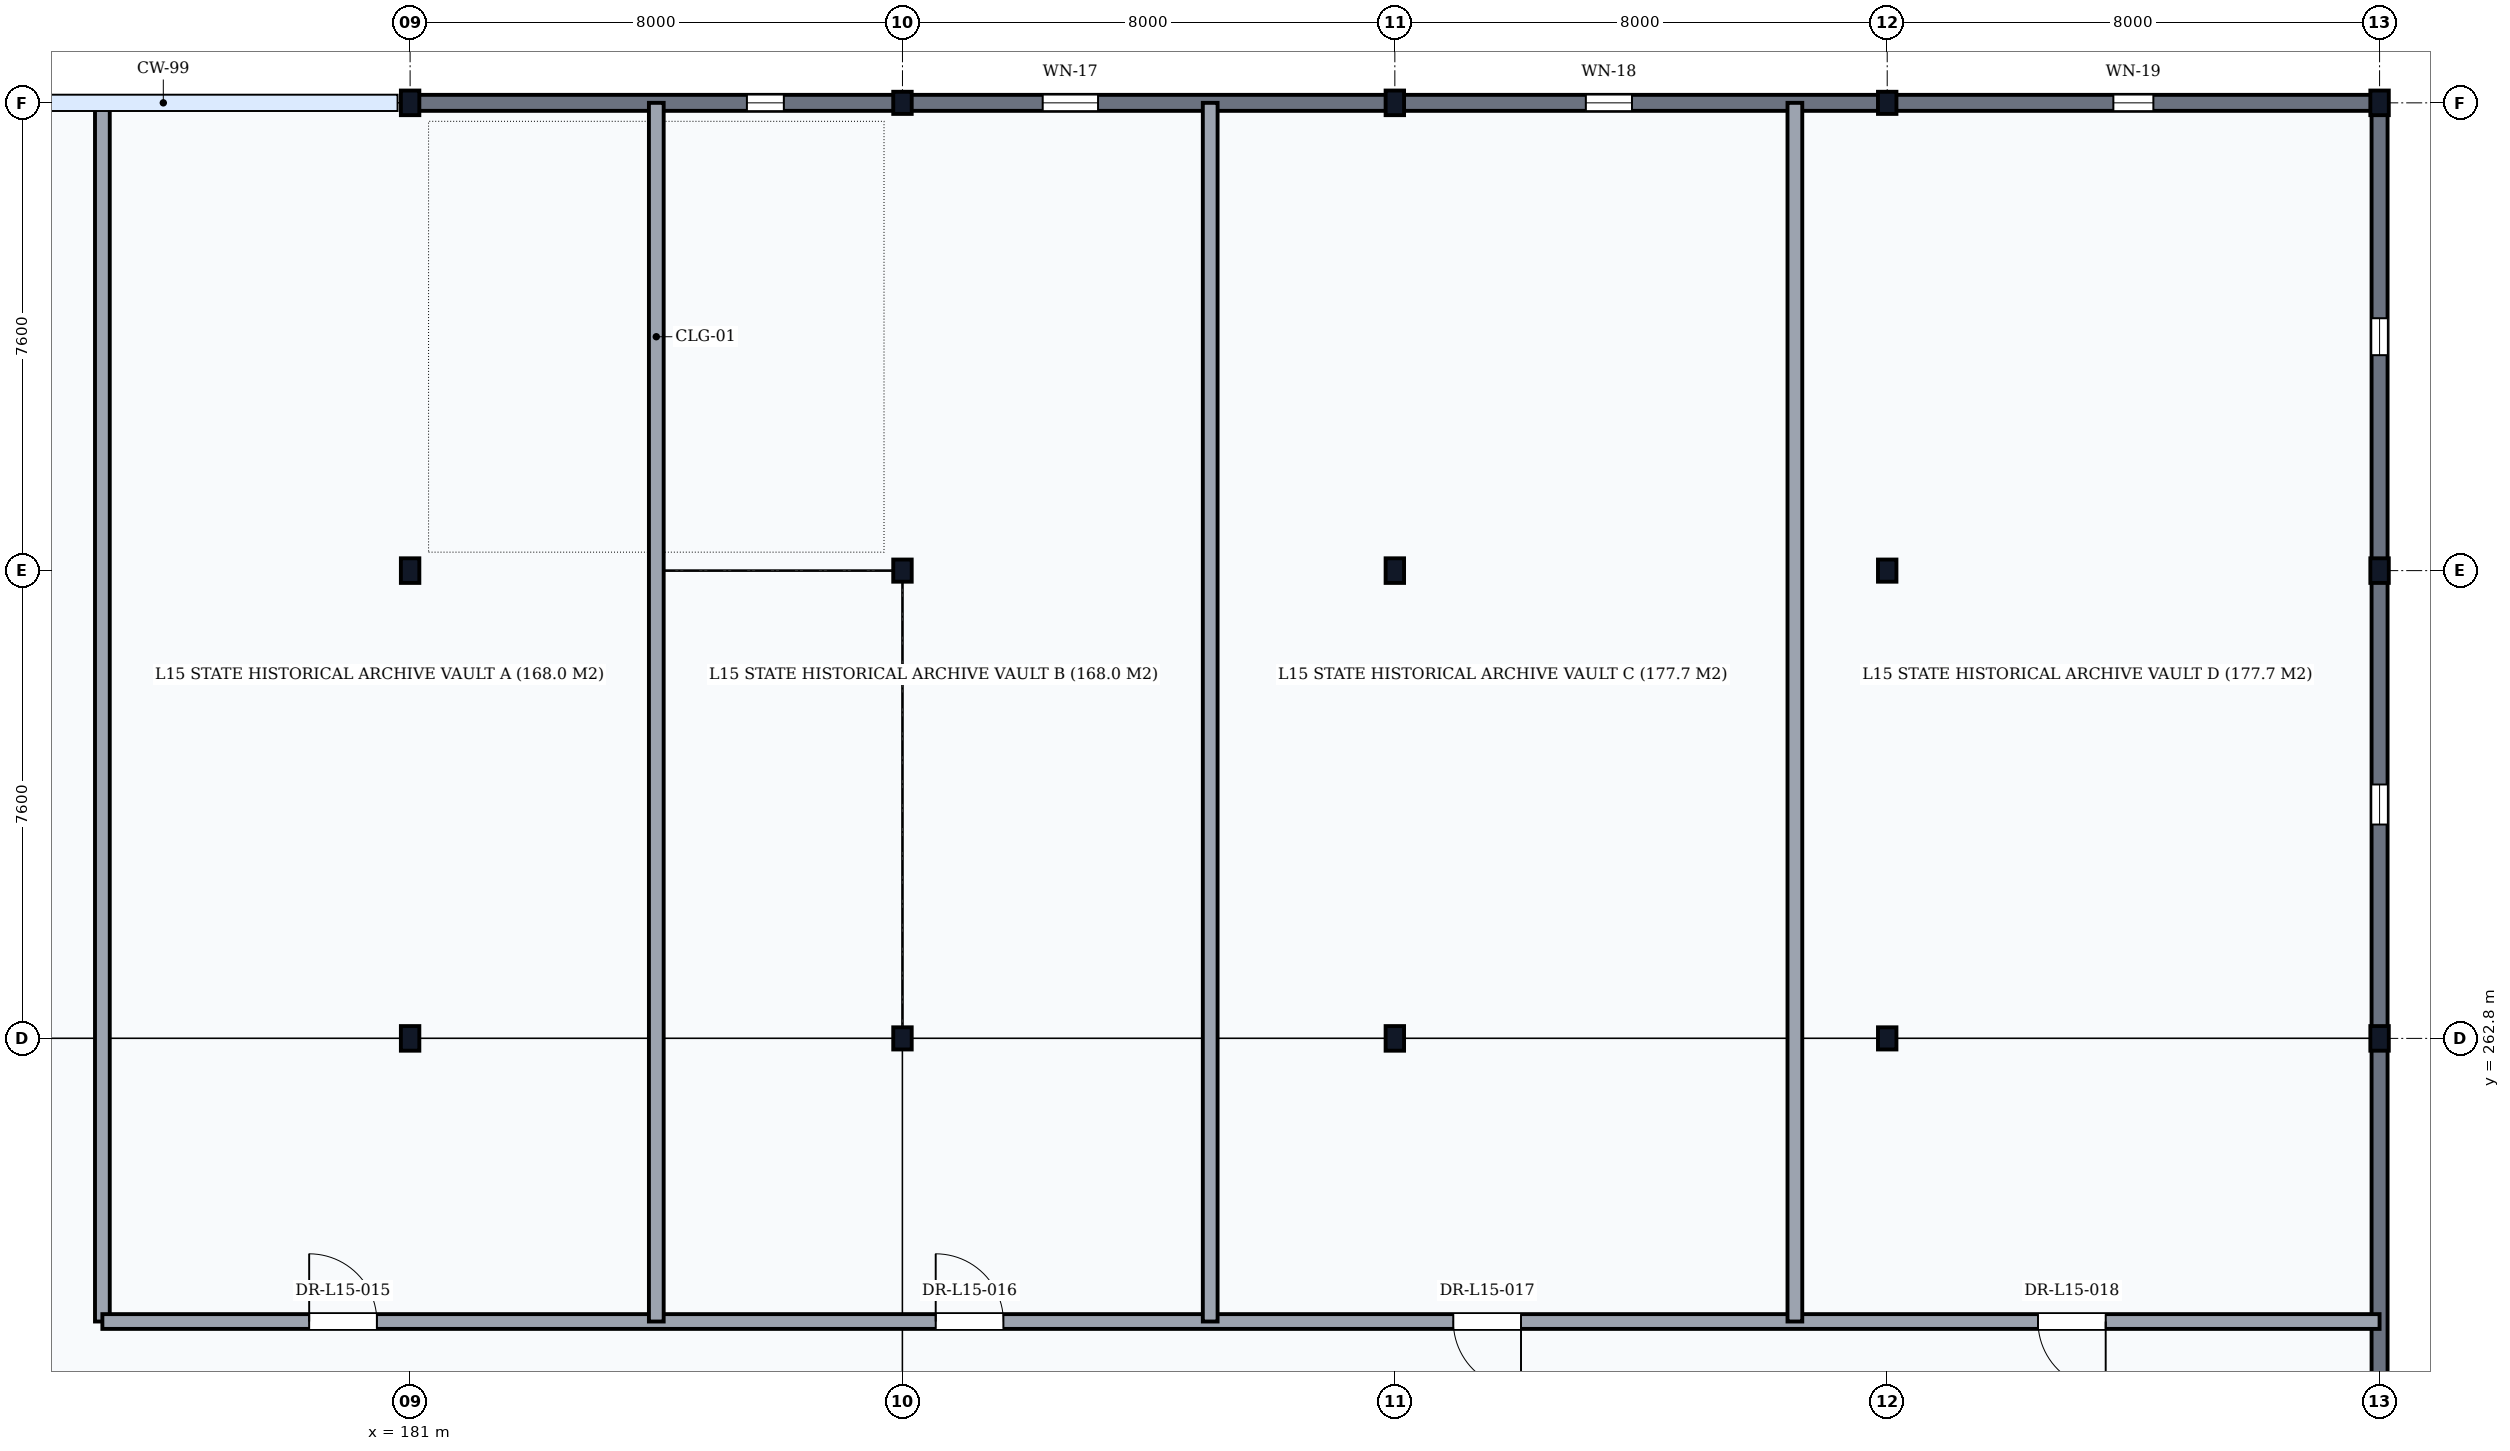
"""IFC4 building model, lengths in metres.
Left out: names, types, materials, properties, quantities, classifications, styles, units other than length and angle.
Written with IfcOpenShell. Run it as: python <this file> out.ifc"""

import sys

from ifc_helpers import new_model, si_unit, direction, frame, frame_2d, origin, origin_2d, place, context, subcontext, project, spatial, rectangle, i_section, extrude, element, fill, save


model = new_model("IFC4")
c1 = context("Model", 3, precision=1e-05, world=origin(), true_north=direction((0.0, 1.0)))
c2 = subcontext(c1, "Body", "Model", "MODEL_VIEW")
j1 = project(units=[si_unit("LENGTHUNIT", "METRE"), si_unit("PLANEANGLEUNIT", "RADIAN")], contexts=[c1])
p1 = place(None, origin())
s1 = spatial("IfcSite", under=j1, at=p1, CompositionType="ELEMENT")
p2 = place(p1, origin())
s2 = spatial("IfcBuilding", under=s1, at=p2, CompositionType="ELEMENT")
p3 = place(p2, frame((0.0, 0.0, 60.0)))
s3 = spatial("IfcBuildingStorey", under=s2, at=p3, CompositionType="ELEMENT", Elevation=60.0)
for number, where, z_axis, x_axis in (
    (1, (181.0, 262.8, 0.0), (0.0, 0.0, 1.0), (1.0, 0.0, 0.0)),
    (2, (181.0, 270.4, 0.0), (0.0, 0.0, 1.0), (1.0, 0.0, 0.0)),
    (3, (181.0, 278.0, 0.0), (0.0, 0.0, 1.0), (1.0, 0.0, 0.0)),
):
    element("IfcColumn", number, at=place(p3, frame(where, z_axis=z_axis, x_axis=x_axis)), inside=s3, PredefinedType="COLUMN", context=c2, shape_type="SweptSolid", body=[
        extrude(i_section(OverallWidth=0.3, OverallDepth=0.4, WebThickness=0.013, FlangeThickness=0.024, FilletRadius=0.027, at=origin_2d()), origin(), (0.0, 0.0, 1.0), 3.9),
    ])
for number, where, z_axis, x_axis in (
    (4, (189.0, 262.8, 0.0), (0.0, 0.0, 1.0), (1.0, 0.0, 0.0)),
    (5, (189.0, 270.4, 0.0), (0.0, 0.0, 1.0), (1.0, 0.0, 0.0)),
    (6, (189.0, 278.0, 0.0), (0.0, 0.0, 1.0), (1.0, 0.0, 0.0)),
):
    element("IfcColumn", number, at=place(p3, frame(where, z_axis=z_axis, x_axis=x_axis)), inside=s3, PredefinedType="COLUMN", context=c2, shape_type="SweptSolid", body=[
        extrude(i_section(OverallWidth=0.3, OverallDepth=0.36, WebThickness=0.012, FlangeThickness=0.022, FilletRadius=0.027, at=origin_2d()), origin(), (0.0, 0.0, 1.0), 3.9),
    ])
for number, where, z_axis, x_axis in (
    (7, (197.0, 262.8, 0.0), (0.0, 0.0, 1.0), (1.0, 0.0, 0.0)),
    (8, (197.0, 270.4, 0.0), (0.0, 0.0, 1.0), (1.0, 0.0, 0.0)),
    (9, (197.0, 278.0, 0.0), (0.0, 0.0, 1.0), (1.0, 0.0, 0.0)),
):
    element("IfcColumn", number, at=place(p3, frame(where, z_axis=z_axis, x_axis=x_axis)), inside=s3, PredefinedType="COLUMN", context=c2, shape_type="SweptSolid", body=[
        extrude(i_section(OverallWidth=0.3, OverallDepth=0.4, WebThickness=0.013, FlangeThickness=0.024, FilletRadius=0.027, at=origin_2d()), origin(), (0.0, 0.0, 1.0), 3.9),
    ])
for number, where, z_axis, x_axis in (
    (10, (205.0, 262.8, 0.0), (0.0, 0.0, 1.0), (1.0, 0.0, 0.0)),
    (11, (205.0, 270.4, 0.0), (0.0, 0.0, 1.0), (1.0, 0.0, 0.0)),
    (12, (205.0, 278.0, 0.0), (0.0, 0.0, 1.0), (1.0, 0.0, 0.0)),
):
    element("IfcColumn", number, at=place(p3, frame(where, z_axis=z_axis, x_axis=x_axis)), inside=s3, PredefinedType="COLUMN", context=c2, shape_type="SweptSolid", body=[
        extrude(i_section(OverallWidth=0.3, OverallDepth=0.36, WebThickness=0.012, FlangeThickness=0.022, FilletRadius=0.027, at=origin_2d()), origin(), (0.0, 0.0, 1.0), 3.9),
    ])
for number, where, z_axis, x_axis in (
    (13, (213.0, 262.8, 0.0), (0.0, 0.0, 1.0), (1.0, 0.0, 0.0)),
    (14, (213.0, 270.4, 0.0), (0.0, 0.0, 1.0), (1.0, 0.0, 0.0)),
    (15, (213.0, 278.0, 0.0), (0.0, 0.0, 1.0), (1.0, 0.0, 0.0)),
):
    element("IfcColumn", number, at=place(p3, frame(where, z_axis=z_axis, x_axis=x_axis)), inside=s3, PredefinedType="COLUMN", context=c2, shape_type="SweptSolid", body=[
        extrude(i_section(OverallWidth=0.3, OverallDepth=0.4, WebThickness=0.013, FlangeThickness=0.024, FilletRadius=0.027, at=origin_2d()), origin(), (0.0, 0.0, 1.0), 3.9),
    ])
p4 = place(p3, frame((181.006, 278.0, 0.0), z_axis=(0.0, 0.0, 1.0), x_axis=(1.0, 0.0, 0.0)))
e16 = element("IfcWall", 16, at=p4, inside=s3, PredefinedType="SOLIDWALL", context=c2, shape_type="SweptSolid", body=[
    extrude(rectangle(XDim=7.988, YDim=0.26, at=frame_2d((3.994, 0.0))), origin(), (0.0, 0.0, 1.0), 3.268),
])
p5 = place(p4, frame((5.466, 0.0, 0.95)))
e17 = element("IfcOpeningElement", 17, at=p5, cuts=e16, PredefinedType="OPENING", context=c2, shape_type="SweptSolid", body=[
    extrude(rectangle(XDim=0.6, YDim=1.5, at=frame_2d((0.3, 0.75))), frame((0.0, 0.145, 0.0), z_axis=(0.0, -1.0, 0.0), x_axis=(1.0, 0.0, 0.0)), (0.0, 0.0, 1.0), 0.29),
])
p6 = place(p3, frame((189.006, 278.0, 0.0), z_axis=(0.0, 0.0, 1.0), x_axis=(1.0, 0.0, 0.0)))
e18 = element("IfcWall", 18, at=p6, inside=s3, PredefinedType="SOLIDWALL", context=c2, shape_type="SweptSolid", body=[
    extrude(rectangle(XDim=7.988, YDim=0.26, at=frame_2d((3.994, 0.0))), origin(), (0.0, 0.0, 1.0), 3.268),
])
p7 = place(p6, frame((2.272, 0.0, 0.928)))
e19 = element("IfcOpeningElement", 19, at=p7, cuts=e18, PredefinedType="OPENING", context=c2, shape_type="SweptSolid", body=[
    extrude(rectangle(XDim=0.9, YDim=2.2, at=frame_2d((0.45, 1.1))), frame((0.0, 0.145, 0.0), z_axis=(0.0, -1.0, 0.0), x_axis=(1.0, 0.0, 0.0)), (0.0, 0.0, 1.0), 0.29),
])
p8 = place(p3, frame((197.006, 278.0, 0.0), z_axis=(0.0, 0.0, 1.0), x_axis=(1.0, 0.0, 0.0)))
e20 = element("IfcWall", 20, at=p8, inside=s3, PredefinedType="SOLIDWALL", context=c2, shape_type="SweptSolid", body=[
    extrude(rectangle(XDim=7.988, YDim=0.26, at=frame_2d((3.994, 0.0))), origin(), (0.0, 0.0, 1.0), 3.268),
])
p9 = place(p8, frame((3.097, 0.0, 0.95)))
e21 = element("IfcOpeningElement", 21, at=p9, cuts=e20, PredefinedType="OPENING", context=c2, shape_type="SweptSolid", body=[
    extrude(rectangle(XDim=0.75, YDim=2.0, at=frame_2d((0.375, 1.0))), frame((0.0, 0.145, 0.0), z_axis=(0.0, -1.0, 0.0), x_axis=(1.0, 0.0, 0.0)), (0.0, 0.0, 1.0), 0.29),
])
p10 = place(p3, frame((205.006, 278.0, 0.0), z_axis=(0.0, 0.0, 1.0), x_axis=(1.0, 0.0, 0.0)))
e22 = element("IfcWall", 22, at=p10, inside=s3, PredefinedType="SOLIDWALL", context=c2, shape_type="SweptSolid", body=[
    extrude(rectangle(XDim=7.988, YDim=0.26, at=frame_2d((3.994, 0.0))), origin(), (0.0, 0.0, 1.0), 3.268),
])
p11 = place(p10, frame((3.669, 0.0, 0.95)))
e23 = element("IfcOpeningElement", 23, at=p11, cuts=e22, PredefinedType="OPENING", context=c2, shape_type="SweptSolid", body=[
    extrude(rectangle(XDim=0.65, YDim=1.8, at=frame_2d((0.325, 0.9))), frame((0.0, 0.145, 0.0), z_axis=(0.0, -1.0, 0.0), x_axis=(1.0, 0.0, 0.0)), (0.0, 0.0, 1.0), 0.29),
])
p12 = place(p3, frame((213.0, 255.206, 0.0), z_axis=(0.0, 0.0, 1.0), x_axis=(0.0, 1.0, 0.0)))
e24 = element("IfcWall", 24, at=p12, inside=s3, PredefinedType="SOLIDWALL", context=c2, shape_type="SweptSolid", body=[
    extrude(rectangle(XDim=7.588, YDim=0.26, at=frame_2d((3.794, 0.0))), origin(), (0.0, 0.0, 1.0), 3.308),
])
p13 = place(p3, frame((213.0, 262.806, 0.0), z_axis=(0.0, 0.0, 1.0), x_axis=(0.0, 1.0, 0.0)))
e25 = element("IfcWall", 25, at=p13, inside=s3, PredefinedType="SOLIDWALL", context=c2, shape_type="SweptSolid", body=[
    extrude(rectangle(XDim=7.588, YDim=0.26, at=frame_2d((3.794, 0.0))), origin(), (0.0, 0.0, 1.0), 3.308),
])
p14 = place(p13, frame((3.469, 0.0, 0.95)))
e26 = element("IfcOpeningElement", 26, at=p14, cuts=e25, PredefinedType="OPENING", context=c2, shape_type="SweptSolid", body=[
    extrude(rectangle(XDim=0.65, YDim=1.8, at=frame_2d((0.325, 0.9))), frame((0.0, 0.145, 0.0), z_axis=(0.0, -1.0, 0.0), x_axis=(1.0, 0.0, 0.0)), (0.0, 0.0, 1.0), 0.29),
])
p15 = place(p3, frame((213.0, 270.406, 0.0), z_axis=(0.0, 0.0, 1.0), x_axis=(0.0, 1.0, 0.0)))
e27 = element("IfcWall", 27, at=p15, inside=s3, PredefinedType="SOLIDWALL", context=c2, shape_type="SweptSolid", body=[
    extrude(rectangle(XDim=7.588, YDim=0.26, at=frame_2d((3.794, 0.0))), origin(), (0.0, 0.0, 1.0), 3.308),
])
p16 = place(p15, frame((3.494, 0.0, 0.95)))
e28 = element("IfcOpeningElement", 28, at=p16, cuts=e27, PredefinedType="OPENING", context=c2, shape_type="SweptSolid", body=[
    extrude(rectangle(XDim=0.6, YDim=1.5, at=frame_2d((0.3, 0.75))), frame((0.0, 0.145, 0.0), z_axis=(0.0, -1.0, 0.0), x_axis=(1.0, 0.0, 0.0)), (0.0, 0.0, 1.0), 0.29),
])
p17 = place(p3, frame((176.0, 258.2, 0.0), z_axis=(0.0, 0.0, 1.0), x_axis=(0.0, 1.0, 0.0)))
e29 = element("IfcWall", 29, at=p17, inside=s3, PredefinedType="PARTITIONING", context=c2, shape_type="SweptSolid", body=[
    extrude(rectangle(XDim=19.8, YDim=0.24, at=frame_2d((9.9, 0.0))), origin(), (0.0, 0.0, 1.0), 3.58),
])
p18 = place(p3, frame((176.0, 258.2, 0.0), z_axis=(0.0, 0.0, 1.0), x_axis=(1.0, 0.0, 0.0)))
e30 = element("IfcWall", 30, at=p18, inside=s3, PredefinedType="PARTITIONING", context=c2, shape_type="SweptSolid", body=[
    extrude(rectangle(XDim=37.0, YDim=0.24, at=frame_2d((18.5, 0.0))), origin(), (0.0, 0.0, 1.0), 3.58),
])
p19 = place(p18, frame((3.36, 0.0, 0.0)))
e31 = element("IfcOpeningElement", 31, at=p19, cuts=e30, PredefinedType="OPENING", context=c2, shape_type="SweptSolid", body=[
    extrude(rectangle(XDim=1.1, YDim=2.1, at=frame_2d((0.55, 1.05))), frame((0.0, 0.135, 0.0), z_axis=(0.0, -1.0, 0.0), x_axis=(1.0, 0.0, 0.0)), (0.0, 0.0, 1.0), 0.27),
])
p20 = place(p18, frame((13.54, 0.0, 0.0)))
e32 = element("IfcOpeningElement", 32, at=p20, cuts=e30, PredefinedType="OPENING", context=c2, shape_type="SweptSolid", body=[
    extrude(rectangle(XDim=1.1, YDim=2.1, at=frame_2d((0.55, 1.05))), frame((0.0, 0.135, 0.0), z_axis=(0.0, -1.0, 0.0), x_axis=(1.0, 0.0, 0.0)), (0.0, 0.0, 1.0), 0.27),
])
p21 = place(p18, frame((21.95, 0.0, 0.0)))
e33 = element("IfcOpeningElement", 33, at=p21, cuts=e30, PredefinedType="OPENING", context=c2, shape_type="SweptSolid", body=[
    extrude(rectangle(XDim=1.1, YDim=2.1, at=frame_2d((0.55, 1.05))), frame((0.0, 0.135, 0.0), z_axis=(0.0, -1.0, 0.0), x_axis=(1.0, 0.0, 0.0)), (0.0, 0.0, 1.0), 0.27),
])
p22 = place(p18, frame((31.45, 0.0, 0.0)))
e34 = element("IfcOpeningElement", 34, at=p22, cuts=e30, PredefinedType="OPENING", context=c2, shape_type="SweptSolid", body=[
    extrude(rectangle(XDim=1.1, YDim=2.1, at=frame_2d((0.55, 1.05))), frame((0.0, 0.135, 0.0), z_axis=(0.0, -1.0, 0.0), x_axis=(1.0, 0.0, 0.0)), (0.0, 0.0, 1.0), 0.27),
])
p23 = place(p3, frame((185.0, 258.2, 0.0), z_axis=(0.0, 0.0, 1.0), x_axis=(0.0, 1.0, 0.0)))
e35 = element("IfcWall", 35, at=p23, inside=s3, PredefinedType="PARTITIONING", context=c2, shape_type="SweptSolid", body=[
    extrude(rectangle(XDim=19.8, YDim=0.24, at=frame_2d((9.9, 0.0))), origin(), (0.0, 0.0, 1.0), 3.248),
])
for number, where, z_axis, x_axis in (
    (36, (194.0, 258.2, 0.0), (0.0, 0.0, 1.0), (0.0, 1.0, 0.0)),
    (37, (203.5, 258.2, 0.0), (0.0, 0.0, 1.0), (0.0, 1.0, 0.0)),
):
    element("IfcWall", number, at=place(p3, frame(where, z_axis=z_axis, x_axis=x_axis)), inside=s3, PredefinedType="PARTITIONING", context=c2, shape_type="SweptSolid", body=[
        extrude(rectangle(XDim=19.8, YDim=0.24, at=frame_2d((9.9, 0.0))), origin(), (0.0, 0.0, 1.0), 3.58),
    ])
p24 = place(p5, origin())
e38 = element("IfcWindow", 38, at=p24, inside=s3, PartitioningType="SINGLE_PANEL", PredefinedType="WINDOW", context=c2, shape_type="SweptSolid", body=[
    extrude(rectangle(XDim=0.6, YDim=1.5, at=frame_2d((0.3, 0.75))), frame((0.0, 0.03, 0.0), z_axis=(0.0, -1.0, 0.0), x_axis=(1.0, 0.0, 0.0)), (0.0, 0.0, 1.0), 0.06),
])
fill(e17, e38)
p25 = place(p7, origin())
e39 = element("IfcWindow", 39, at=p25, inside=s3, PartitioningType="SINGLE_PANEL", PredefinedType="WINDOW", context=c2, shape_type="SweptSolid", body=[
    extrude(rectangle(XDim=0.9, YDim=2.2, at=frame_2d((0.45, 1.1))), frame((0.0, 0.03, 0.0), z_axis=(0.0, -1.0, 0.0), x_axis=(1.0, 0.0, 0.0)), (0.0, 0.0, 1.0), 0.06),
])
fill(e19, e39)
p26 = place(p9, origin())
e40 = element("IfcWindow", 40, at=p26, inside=s3, PartitioningType="SINGLE_PANEL", PredefinedType="WINDOW", context=c2, shape_type="SweptSolid", body=[
    extrude(rectangle(XDim=0.75, YDim=2.0, at=frame_2d((0.375, 1.0))), frame((0.0, 0.03, 0.0), z_axis=(0.0, -1.0, 0.0), x_axis=(1.0, 0.0, 0.0)), (0.0, 0.0, 1.0), 0.06),
])
fill(e21, e40)
p27 = place(p11, origin())
e41 = element("IfcWindow", 41, at=p27, inside=s3, PartitioningType="SINGLE_PANEL", PredefinedType="WINDOW", context=c2, shape_type="SweptSolid", body=[
    extrude(rectangle(XDim=0.65, YDim=1.8, at=frame_2d((0.325, 0.9))), frame((0.0, 0.03, 0.0), z_axis=(0.0, -1.0, 0.0), x_axis=(1.0, 0.0, 0.0)), (0.0, 0.0, 1.0), 0.06),
])
fill(e23, e41)
p28 = place(p14, origin())
e42 = element("IfcWindow", 42, at=p28, inside=s3, PartitioningType="SINGLE_PANEL", PredefinedType="WINDOW", context=c2, shape_type="SweptSolid", body=[
    extrude(rectangle(XDim=0.65, YDim=1.8, at=frame_2d((0.325, 0.9))), frame((0.0, 0.03, 0.0), z_axis=(0.0, -1.0, 0.0), x_axis=(1.0, 0.0, 0.0)), (0.0, 0.0, 1.0), 0.06),
])
fill(e26, e42)
p29 = place(p16, origin())
e43 = element("IfcWindow", 43, at=p29, inside=s3, PartitioningType="SINGLE_PANEL", PredefinedType="WINDOW", context=c2, shape_type="SweptSolid", body=[
    extrude(rectangle(XDim=0.6, YDim=1.5, at=frame_2d((0.3, 0.75))), frame((0.0, 0.03, 0.0), z_axis=(0.0, -1.0, 0.0), x_axis=(1.0, 0.0, 0.0)), (0.0, 0.0, 1.0), 0.06),
])
fill(e28, e43)
p30 = place(p19, origin())
e44 = element("IfcDoor", 44, at=p30, inside=s3, OperationType="SINGLE_SWING_LEFT", PredefinedType="DOOR", context=c2, shape_type="SweptSolid", body=[
    extrude(rectangle(XDim=1.1, YDim=2.1, at=frame_2d((0.55, 1.05))), frame((0.0, 0.025, 0.0), z_axis=(0.0, -1.0, 0.0), x_axis=(1.0, 0.0, 0.0)), (0.0, 0.0, 1.0), 0.05),
])
fill(e31, e44)
p31 = place(p20, origin())
e45 = element("IfcDoor", 45, at=p31, inside=s3, OperationType="SINGLE_SWING_LEFT", PredefinedType="DOOR", context=c2, shape_type="SweptSolid", body=[
    extrude(rectangle(XDim=1.1, YDim=2.1, at=frame_2d((0.55, 1.05))), frame((0.0, 0.025, 0.0), z_axis=(0.0, -1.0, 0.0), x_axis=(1.0, 0.0, 0.0)), (0.0, 0.0, 1.0), 0.05),
])
fill(e32, e45)
p32 = place(p21, origin())
e46 = element("IfcDoor", 46, at=p32, inside=s3, OperationType="SINGLE_SWING_RIGHT", PredefinedType="DOOR", context=c2, shape_type="SweptSolid", body=[
    extrude(rectangle(XDim=1.1, YDim=2.1, at=frame_2d((0.55, 1.05))), frame((0.0, 0.025, 0.0), z_axis=(0.0, -1.0, 0.0), x_axis=(1.0, 0.0, 0.0)), (0.0, 0.0, 1.0), 0.05),
])
fill(e33, e46)
p33 = place(p22, origin())
e47 = element("IfcDoor", 47, at=p33, inside=s3, OperationType="SINGLE_SWING_RIGHT", PredefinedType="DOOR", context=c2, shape_type="SweptSolid", body=[
    extrude(rectangle(XDim=1.1, YDim=2.1, at=frame_2d((0.55, 1.05))), frame((0.0, 0.025, 0.0), z_axis=(0.0, -1.0, 0.0), x_axis=(1.0, 0.0, 0.0)), (0.0, 0.0, 1.0), 0.05),
])
fill(e34, e47)
save(model, sys.argv[1])
